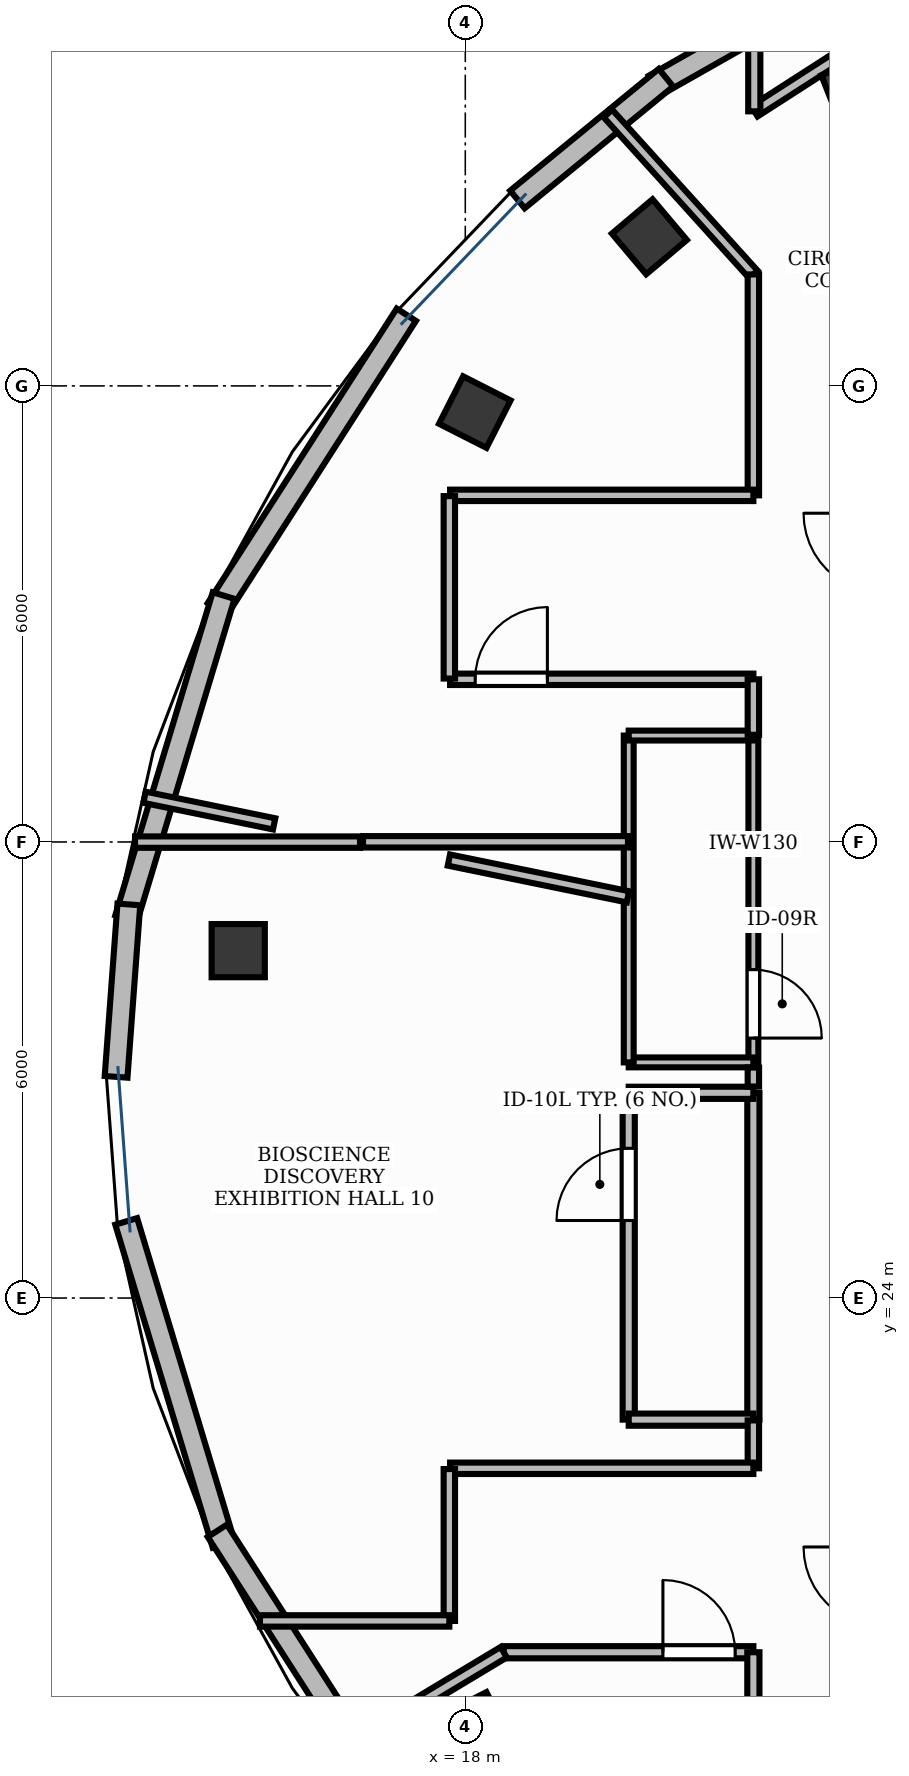
"""IFC4 building model, lengths in metres.
Left out: names, types, materials, properties, quantities, classifications, styles, units other than length and angle.
Written with IfcOpenShell. Run it as: python <this file> out.ifc"""

import sys

from ifc_helpers import new_model, si_unit, direction, frame, frame_2d, origin, origin_2d, place, context, subcontext, project, spatial, rectangle, extrude, element, fill, save


model = new_model("IFC4")
c1 = context("Model", 3, precision=1e-05, world=origin(), true_north=direction((0.0, 1.0)))
c2 = subcontext(c1, "Body", "Model", "MODEL_VIEW")
j1 = project(units=[si_unit("LENGTHUNIT", "METRE"), si_unit("PLANEANGLEUNIT", "RADIAN")], contexts=[c1])
p1 = place(None, origin())
s1 = spatial("IfcSite", under=j1, at=p1, CompositionType="ELEMENT")
p2 = place(p1, origin())
s2 = spatial("IfcBuilding", under=s1, at=p2, CompositionType="ELEMENT")
p3 = place(p2, frame((0.0, 0.0, 318.6)))
s3 = spatial("IfcBuildingStorey", under=s2, at=p3, CompositionType="ELEMENT", Elevation=318.6)
for number, where, z_axis, x_axis in (
    (1, (23.138, 39.889, -0.0), (0.0, 0.0, 1.0), (0.93, 0.367, 0.0)),
    (2, (20.422, 37.962, -0.0), (0.0, 0.0, 1.0), (0.764, 0.645, 0.0)),
    (3, (18.125, 35.655, -0.0), (0.0, 0.0, 1.0), (0.453, 0.891, 0.0)),
    (4, (15.013, 28.57, -0.0), (0.0, 0.0, 1.0), (0.0, 1.0, 0.0)),
    (5, (18.125, 18.345, -0.0), (0.0, 0.0, 1.0), (-0.453, 0.891, 0.0)),
):
    element("IfcColumn", number, at=place(p3, frame(where, z_axis=z_axis, x_axis=x_axis)), inside=s3, PredefinedType="COLUMN", context=c2, shape_type="SweptSolid", body=[
        extrude(rectangle(XDim=0.7, YDim=0.7, at=origin_2d()), origin(), (0.0, 0.0, 1.0), 3.791),
    ])
p4 = place(p3, frame((24.883, 42.442, 0.0), z_axis=(0.0, 0.0, 1.0), x_axis=(-0.869895003659, -0.493236943679, 0.0)))
e6 = element("IfcWall", 6, at=p4, inside=s3, PredefinedType="STANDARD", context=c2, shape_type="SweptSolid", body=[
    extrude(rectangle(XDim=5.051, YDim=0.3, at=frame_2d((2.526, 0.0))), origin(), (0.0, 0.0, 1.0), 3.79),
])
p5 = place(p3, frame((20.64, 40.054, 0.0), z_axis=(0.0, 0.0, 1.0), x_axis=(-0.77351792086, -0.633774428411, 0.0)))
e7 = element("IfcWall", 7, at=p5, inside=s3, PredefinedType="STANDARD", context=c2, shape_type="SweptSolid", body=[
    extrude(rectangle(XDim=2.526, YDim=0.3, at=frame_2d((1.263, 0.0))), origin(), (0.0, 0.0, 1.0), 3.79),
])
p6 = place(p3, frame((17.224, 36.936, 0.0), z_axis=(0.0, 0.0, 1.0), x_axis=(-0.540087262842, -0.841609023547, 0.0)))
e8 = element("IfcWall", 8, at=p6, inside=s3, PredefinedType="STANDARD", context=c2, shape_type="SweptSolid", body=[
    extrude(rectangle(XDim=4.603, YDim=0.3, at=frame_2d((2.302, 0.0))), origin(), (0.0, 0.0, 1.0), 3.79),
])
p7 = place(p3, frame((14.821, 33.241, 0.0), z_axis=(0.0, 0.0, 1.0), x_axis=(-0.288720187326, -0.95741352269, 0.0)))
e9 = element("IfcWall", 9, at=p7, inside=s3, PredefinedType="STANDARD", context=c2, shape_type="SweptSolid", body=[
    extrude(rectangle(XDim=4.438, YDim=0.3, at=frame_2d((2.219, 0.0))), origin(), (0.0, 0.0, 1.0), 3.79),
])
p8 = place(p3, frame((13.573, 29.178, 0.0), z_axis=(0.0, 0.0, 1.0), x_axis=(-0.073741209899, -0.997277410735, 0.0)))
e10 = element("IfcWall", 10, at=p8, inside=s3, PredefinedType="STANDARD", context=c2, shape_type="SweptSolid", body=[
    extrude(rectangle(XDim=2.274, YDim=0.3, at=frame_2d((1.137, 0.0))), origin(), (0.0, 0.0, 1.0), 3.79),
])
p9 = place(p3, frame((13.539, 25.008, 0.0), z_axis=(0.0, 0.0, 1.0), x_axis=(0.288720187326, -0.95741352269, 0.0)))
e11 = element("IfcWall", 11, at=p9, inside=s3, PredefinedType="STANDARD", context=c2, shape_type="SweptSolid", body=[
    extrude(rectangle(XDim=4.438, YDim=0.3, at=frame_2d((2.219, 0.0))), origin(), (0.0, 0.0, 1.0), 3.79),
])
p10 = place(p3, frame((14.738, 20.938, 0.0), z_axis=(0.0, 0.0, 1.0), x_axis=(0.540087262842, -0.841609023547, 0.0)))
e12 = element("IfcWall", 12, at=p10, inside=s3, PredefinedType="STANDARD", context=c2, shape_type="SweptSolid", body=[
    extrude(rectangle(XDim=4.603, YDim=0.3, at=frame_2d((2.302, 0.0))), origin(), (0.0, 0.0, 1.0), 3.79),
])
p11 = place(p3, frame((20.15, 22.4, 0.0), z_axis=(0.0, 0.0, 1.0), x_axis=(0.0, 1.0, 0.0)))
e13 = element("IfcWall", 13, at=p11, inside=s3, PredefinedType="PARTITIONING", context=c2, shape_type="SweptSolid", body=[
    extrude(rectangle(XDim=4.3, YDim=0.16, at=frame_2d((2.15, 0.0))), origin(), (0.0, 0.0, 1.0), 2.8),
])
p12 = place(p11, frame((2.62, 0.0, 0.0)))
e14 = element("IfcOpeningElement", 14, at=p12, cuts=e13, PredefinedType="OPENING", context=c2, shape_type="SweptSolid", body=[
    extrude(rectangle(XDim=0.95, YDim=2.15, at=frame_2d((0.475, 1.075))), frame((0.0, 0.095, 0.0), z_axis=(0.0, -1.0, 0.0), x_axis=(1.0, 0.0, 0.0)), (0.0, 0.0, 1.0), 0.19),
])
p13 = place(p3, frame((21.79, 31.4, 0.0), z_axis=(0.0, 0.0, 1.0), x_axis=(0.0, -1.0, 0.0)))
e15 = element("IfcWall", 15, at=p13, inside=s3, PredefinedType="PARTITIONING", context=c2, shape_type="SweptSolid", body=[
    extrude(rectangle(XDim=4.3, YDim=0.13, at=frame_2d((2.15, 0.0))), origin(), (0.0, 0.0, 1.0), 2.8),
])
p14 = place(p13, frame((3.08, 0.0, 0.0)))
e16 = element("IfcOpeningElement", 16, at=p14, cuts=e15, PredefinedType="OPENING", context=c2, shape_type="SweptSolid", body=[
    extrude(rectangle(XDim=0.9, YDim=2.15, at=frame_2d((0.45, 1.075))), frame((0.0, 0.08, 0.0), z_axis=(0.0, -1.0, 0.0), x_axis=(1.0, 0.0, 0.0)), (0.0, 0.0, 1.0), 0.16),
])
p15 = place(p3, frame((18.505, 19.34, 0.0), z_axis=(0.0, 0.0, 1.0), x_axis=(1.0, 0.0, 0.0)))
e17 = element("IfcWall", 17, at=p15, inside=s3, PredefinedType="PARTITIONING", context=c2, shape_type="SweptSolid", body=[
    extrude(rectangle(XDim=3.285, YDim=0.16, at=frame_2d((1.643, 0.0))), origin(), (0.0, 0.0, 1.0), 2.8),
])
p16 = place(p15, frame((2.095, 0.0, 0.0)))
e18 = element("IfcOpeningElement", 18, at=p16, cuts=e17, PredefinedType="OPENING", context=c2, shape_type="SweptSolid", body=[
    extrude(rectangle(XDim=0.95, YDim=2.15, at=frame_2d((0.475, 1.075))), frame((0.0, 0.095, 0.0), z_axis=(0.0, -1.0, 0.0), x_axis=(1.0, 0.0, 0.0)), (0.0, 0.0, 1.0), 0.19),
])
p17 = place(p3, frame((17.8, 32.14, 0.0), z_axis=(0.0, 0.0, 1.0), x_axis=(1.0, 0.0, 0.0)))
e19 = element("IfcWall", 19, at=p17, inside=s3, PredefinedType="PARTITIONING", context=c2, shape_type="SweptSolid", body=[
    extrude(rectangle(XDim=3.99, YDim=0.15, at=frame_2d((1.995, 0.0))), origin(), (0.0, 0.0, 1.0), 2.8),
])
p18 = place(p17, frame((0.33, 0.0, 0.0)))
e20 = element("IfcOpeningElement", 20, at=p18, cuts=e19, PredefinedType="OPENING", context=c2, shape_type="SweptSolid", body=[
    extrude(rectangle(XDim=0.95, YDim=2.15, at=frame_2d((0.475, 1.075))), frame((0.0, 0.09, 0.0), z_axis=(0.0, -1.0, 0.0), x_axis=(1.0, 0.0, 0.0)), (0.0, 0.0, 1.0), 0.18),
])
p19 = place(p3, frame((21.79, 26.7, 0.0), z_axis=(0.0, 0.0, 1.0), x_axis=(0.0, -1.0, 0.0)))
e21 = element("IfcWall", 21, at=p19, inside=s3, PredefinedType="PARTITIONING", context=c2, shape_type="SweptSolid", body=[
    extrude(rectangle(XDim=4.3, YDim=0.16, at=frame_2d((2.15, 0.0))), origin(), (0.0, 0.0, 1.0), 2.8),
])
for number, where, z_axis, x_axis in (
    (22, (21.79, 22.4, 0.0), (0.0, 0.0, 1.0), (-1.0, 0.0, 0.0)),
    (23, (20.15, 26.7, 0.0), (0.0, 0.0, 1.0), (1.0, 0.0, 0.0)),
):
    element("IfcWall", number, at=place(p3, frame(where, z_axis=z_axis, x_axis=x_axis)), inside=s3, PredefinedType="PARTITIONING", context=c2, shape_type="SweptSolid", body=[
        extrude(rectangle(XDim=1.64, YDim=0.16, at=frame_2d((0.82, 0.0))), origin(), (0.0, 0.0, 1.0), 2.8),
    ])
p20 = place(p3, frame((21.79, 27.1, 0.0), z_axis=(0.0, 0.0, 1.0), x_axis=(-1.0, 0.0, 0.0)))
e24 = element("IfcWall", 24, at=p20, inside=s3, PredefinedType="PARTITIONING", context=c2, shape_type="SweptSolid", body=[
    extrude(rectangle(XDim=1.64, YDim=0.13, at=frame_2d((0.82, 0.0))), origin(), (0.0, 0.0, 1.0), 2.8),
])
p21 = place(p3, frame((20.15, 27.1, 0.0), z_axis=(0.0, 0.0, 1.0), x_axis=(0.0, 1.0, 0.0)))
e25 = element("IfcWall", 25, at=p21, inside=s3, PredefinedType="PARTITIONING", context=c2, shape_type="SweptSolid", body=[
    extrude(rectangle(XDim=4.3, YDim=0.13, at=frame_2d((2.15, 0.0))), origin(), (0.0, 0.0, 1.0), 2.8),
])
p22 = place(p3, frame((20.15, 31.4, 0.0), z_axis=(0.0, 0.0, 1.0), x_axis=(1.0, 0.0, 0.0)))
e26 = element("IfcWall", 26, at=p22, inside=s3, PredefinedType="PARTITIONING", context=c2, shape_type="SweptSolid", body=[
    extrude(rectangle(XDim=1.64, YDim=0.13, at=frame_2d((0.82, 0.0))), origin(), (0.0, 0.0, 1.0), 2.8),
])
p23 = place(p3, frame((16.356, 18.049, 0.0), z_axis=(0.0, 0.0, 1.0), x_axis=(0.857166307375, 0.51503972808, 0.0)))
e27 = element("IfcWall", 27, at=p23, inside=s3, PredefinedType="PARTITIONING", context=c2, shape_type="SweptSolid", body=[
    extrude(rectangle(XDim=2.508, YDim=0.16, at=frame_2d((1.254, 0.0))), origin(), (0.0, 0.0, 1.0), 2.8),
])
p24 = place(p3, frame((21.79, 19.34, 0.0), z_axis=(0.0, 0.0, 1.0), x_axis=(0.0, -1.0, 0.0)))
e28 = element("IfcWall", 28, at=p24, inside=s3, PredefinedType="PARTITIONING", context=c2, shape_type="SweptSolid", body=[
    extrude(rectangle(XDim=4.709, YDim=0.16, at=frame_2d((2.355, 0.0))), origin(), (0.0, 0.0, 1.0), 2.8),
])
p25 = place(p3, frame((23.086, 40.438, 0.0), z_axis=(0.0, 0.0, 1.0), x_axis=(-0.841116099264, -0.540854608522, 0.0)))
e29 = element("IfcWall", 29, at=p25, inside=s3, PredefinedType="PARTITIONING", context=c2, shape_type="SweptSolid", body=[
    extrude(rectangle(XDim=1.526, YDim=0.16, at=frame_2d((0.763, 0.0))), origin(), (0.0, 0.0, 1.0), 2.8),
])
p26 = place(p3, frame((21.802, 39.612, 0.0), z_axis=(0.0, 0.0, 1.0), x_axis=(0.0, 1.0, 0.0)))
e30 = element("IfcWall", 30, at=p26, inside=s3, PredefinedType="PARTITIONING", context=c2, shape_type="SweptSolid", body=[
    extrude(rectangle(XDim=1.269, YDim=0.16, at=frame_2d((0.634, 0.0))), origin(), (0.0, 0.0, 1.0), 2.8),
])
p27 = place(p3, frame((13.655, 29.998, 0.0), z_axis=(0.0, 0.0, 1.0), x_axis=(1.0, 0.0, 0.0)))
e31 = element("IfcWall", 31, at=p27, inside=s3, PredefinedType="PARTITIONING", context=c2, shape_type="SweptSolid", body=[
    extrude(rectangle(XDim=2.96, YDim=0.15, at=frame_2d((1.48, 0.0))), origin(), (0.0, 0.0, 1.0), 2.8),
])
p28 = place(p3, frame((15.485, 30.238, 0.0), z_axis=(0.0, 0.0, 1.0), x_axis=(-0.979592080044, 0.200995912185, 0.0)))
e32 = element("IfcWall", 32, at=p28, inside=s3, PredefinedType="PARTITIONING", context=c2, shape_type="SweptSolid", body=[
    extrude(rectangle(XDim=1.74, YDim=0.15, at=frame_2d((0.87, 0.0))), origin(), (0.0, 0.0, 1.0), 2.8),
])
p29 = place(p3, frame((19.877, 39.583, 0.0), z_axis=(0.0, 0.0, 1.0), x_axis=(0.670438239368, -0.741965340965, 0.0)))
e33 = element("IfcWall", 33, at=p29, inside=s3, PredefinedType="PARTITIONING", context=c2, shape_type="SweptSolid", body=[
    extrude(rectangle(XDim=2.854, YDim=0.15, at=frame_2d((1.427, 0.0))), origin(), (0.0, 0.0, 1.0), 2.8),
])
p30 = place(p3, frame((21.79, 37.466, 0.0), z_axis=(0.0, 0.0, 1.0), x_axis=(0.0, -1.0, 0.0)))
e34 = element("IfcWall", 34, at=p30, inside=s3, PredefinedType="PARTITIONING", context=c2, shape_type="SweptSolid", body=[
    extrude(rectangle(XDim=2.906, YDim=0.15, at=frame_2d((1.453, 0.0))), origin(), (0.0, 0.0, 1.0), 2.8),
])
p31 = place(p3, frame((21.79, 34.56, 0.0), z_axis=(0.0, 0.0, 1.0), x_axis=(-1.0, 0.0, 0.0)))
e35 = element("IfcWall", 35, at=p31, inside=s3, PredefinedType="PARTITIONING", context=c2, shape_type="SweptSolid", body=[
    extrude(rectangle(XDim=3.99, YDim=0.15, at=frame_2d((1.995, 0.0))), origin(), (0.0, 0.0, 1.0), 2.8),
])
p32 = place(p3, frame((17.79, 34.55, 0.0), z_axis=(0.0, 0.0, 1.0), x_axis=(0.0, -1.0, 0.0)))
e36 = element("IfcWall", 36, at=p32, inside=s3, PredefinedType="PARTITIONING", context=c2, shape_type="SweptSolid", body=[
    extrude(rectangle(XDim=2.4, YDim=0.15, at=frame_2d((1.2, 0.0))), origin(), (0.0, 0.0, 1.0), 2.8),
])
p33 = place(p3, frame((21.79, 32.14, 0.0), z_axis=(0.0, 0.0, 1.0), x_axis=(0.0, -1.0, 0.0)))
e37 = element("IfcWall", 37, at=p33, inside=s3, PredefinedType="PARTITIONING", context=c2, shape_type="SweptSolid", body=[
    extrude(rectangle(XDim=0.73, YDim=0.15, at=frame_2d((0.365, 0.0))), origin(), (0.0, 0.0, 1.0), 2.8),
])
p34 = place(p3, frame((20.14, 30.002, 0.0), z_axis=(0.0, 0.0, 1.0), x_axis=(-1.0, 0.0, 0.0)))
e38 = element("IfcWall", 38, at=p34, inside=s3, PredefinedType="PARTITIONING", context=c2, shape_type="SweptSolid", body=[
    extrude(rectangle(XDim=3.485, YDim=0.15, at=frame_2d((1.743, 0.0))), origin(), (0.0, 0.0, 1.0), 2.8),
])
p35 = place(p3, frame((17.784, 29.762, 0.0), z_axis=(0.0, 0.0, 1.0), x_axis=(0.979588350518, -0.201014087887, 0.0)))
e39 = element("IfcWall", 39, at=p35, inside=s3, PredefinedType="PARTITIONING", context=c2, shape_type="SweptSolid", body=[
    extrude(rectangle(XDim=2.405, YDim=0.15, at=frame_2d((1.202, 0.0))), origin(), (0.0, 0.0, 1.0), 2.8),
])
p36 = place(p3, frame((21.79, 27.032, 0.0), z_axis=(0.0, 0.0, 1.0), x_axis=(0.0, -1.0, 0.0)))
e40 = element("IfcWall", 40, at=p36, inside=s3, PredefinedType="PARTITIONING", context=c2, shape_type="SweptSolid", body=[
    extrude(rectangle(XDim=0.249, YDim=0.15, at=frame_2d((0.125, 0.0))), origin(), (0.0, 0.0, 1.0), 2.8),
])
p37 = place(p3, frame((21.79, 22.39, 0.0), z_axis=(0.0, 0.0, 1.0), x_axis=(0.0, -1.0, 0.0)))
e41 = element("IfcWall", 41, at=p37, inside=s3, PredefinedType="PARTITIONING", context=c2, shape_type="SweptSolid", body=[
    extrude(rectangle(XDim=0.63, YDim=0.15, at=frame_2d((0.315, 0.0))), origin(), (0.0, 0.0, 1.0), 2.8),
])
p38 = place(p3, frame((21.79, 21.76, 0.0), z_axis=(0.0, 0.0, 1.0), x_axis=(-1.0, 0.0, 0.0)))
e42 = element("IfcWall", 42, at=p38, inside=s3, PredefinedType="PARTITIONING", context=c2, shape_type="SweptSolid", body=[
    extrude(rectangle(XDim=3.99, YDim=0.15, at=frame_2d((1.995, 0.0))), origin(), (0.0, 0.0, 1.0), 2.8),
])
p39 = place(p3, frame((17.79, 21.75, 0.0), z_axis=(0.0, 0.0, 1.0), x_axis=(0.0, -1.0, 0.0)))
e43 = element("IfcWall", 43, at=p39, inside=s3, PredefinedType="PARTITIONING", context=c2, shape_type="SweptSolid", body=[
    extrude(rectangle(XDim=1.998, YDim=0.15, at=frame_2d((0.999, 0.0))), origin(), (0.0, 0.0, 1.0), 2.8),
])
p40 = place(p3, frame((17.79, 19.752, 0.0), z_axis=(0.0, 0.0, 1.0), x_axis=(-1.0, 0.0, 0.0)))
e44 = element("IfcWall", 44, at=p40, inside=s3, PredefinedType="PARTITIONING", context=c2, shape_type="SweptSolid", body=[
    extrude(rectangle(XDim=2.491, YDim=0.15, at=frame_2d((1.246, 0.0))), origin(), (0.0, 0.0, 1.0), 2.8),
])
p41 = place(p12, origin())
e45 = element("IfcDoor", 45, at=p41, inside=s3, OperationType="SINGLE_SWING_LEFT", PredefinedType="DOOR", context=c2, shape_type="SweptSolid", body=[
    extrude(rectangle(XDim=0.95, YDim=2.15, at=frame_2d((0.475, 1.075))), frame((0.0, 0.025, 0.0), z_axis=(0.0, -1.0, 0.0), x_axis=(1.0, 0.0, 0.0)), (0.0, 0.0, 1.0), 0.05),
])
fill(e14, e45)
p42 = place(p14, origin())
e46 = element("IfcDoor", 46, at=p42, inside=s3, OperationType="SINGLE_SWING_RIGHT", PredefinedType="DOOR", context=c2, shape_type="SweptSolid", body=[
    extrude(rectangle(XDim=0.9, YDim=2.15, at=frame_2d((0.45, 1.075))), frame((0.0, 0.025, 0.0), z_axis=(0.0, -1.0, 0.0), x_axis=(1.0, 0.0, 0.0)), (0.0, 0.0, 1.0), 0.05),
])
fill(e16, e46)
p43 = place(p16, origin())
e47 = element("IfcDoor", 47, at=p43, inside=s3, OperationType="SINGLE_SWING_LEFT", PredefinedType="DOOR", context=c2, shape_type="SweptSolid", body=[
    extrude(rectangle(XDim=0.95, YDim=2.15, at=frame_2d((0.475, 1.075))), frame((0.0, 0.025, 0.0), z_axis=(0.0, -1.0, 0.0), x_axis=(1.0, 0.0, 0.0)), (0.0, 0.0, 1.0), 0.05),
])
fill(e18, e47)
p44 = place(p18, origin())
e48 = element("IfcDoor", 48, at=p44, inside=s3, OperationType="SINGLE_SWING_RIGHT", PredefinedType="DOOR", context=c2, shape_type="SweptSolid", body=[
    extrude(rectangle(XDim=0.95, YDim=2.15, at=frame_2d((0.475, 1.075))), frame((0.0, 0.025, 0.0), z_axis=(0.0, -1.0, 0.0), x_axis=(1.0, 0.0, 0.0)), (0.0, 0.0, 1.0), 0.05),
])
fill(e20, e48)
save(model, sys.argv[1])
